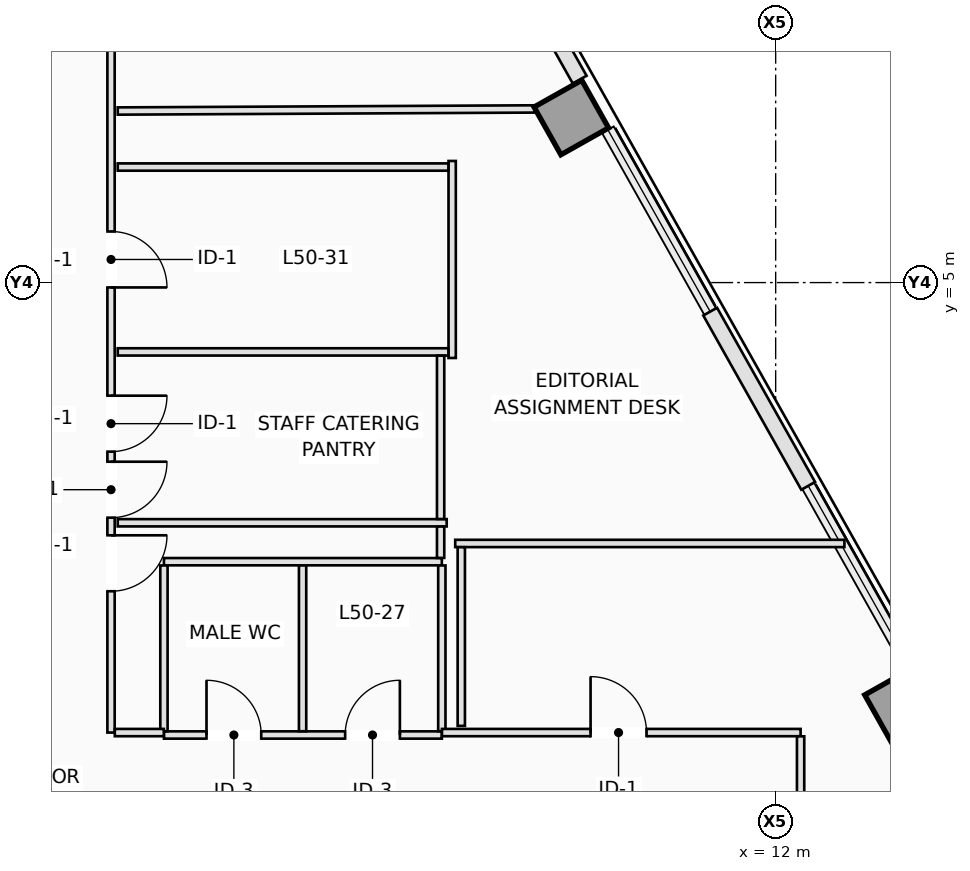
"""IFC4 building model, lengths in metres.
Left out: names, types, materials, properties, quantities, classifications, styles, units other than length and angle.
Written with IfcOpenShell. Run it as: python <this file> out.ifc"""

import sys

from ifc_helpers import new_model, si_unit, direction, frame, frame_2d, origin, origin_2d, place, context, subcontext, project, spatial, rectangle, extrude, element, fill, save


model = new_model("IFC4")
c1 = context("Model", 3, precision=1e-05, world=origin(), true_north=direction((0.0, 1.0)))
c2 = subcontext(c1, "Body", "Model", "MODEL_VIEW")
j1 = project(units=[si_unit("LENGTHUNIT", "METRE"), si_unit("PLANEANGLEUNIT", "RADIAN")], contexts=[c1])
p1 = place(None, origin())
s1 = spatial("IfcSite", under=j1, at=p1, CompositionType="ELEMENT")
p2 = place(p1, origin())
s2 = spatial("IfcBuilding", under=s1, at=p2, CompositionType="ELEMENT")
p3 = place(p2, frame((0.0, 0.0, 183.4)))
s3 = spatial("IfcBuildingStorey", under=s2, at=p3, CompositionType="ELEMENT", Elevation=183.4)
for number, where, z_axis, x_axis in (
    (1, (14.077, -1.952, 0.0), (0.0, 0.0, 1.0), (0.872, 0.49, 0.0)),
    (2, (8.64, 7.715, 0.0), (0.0, 0.0, 1.0), (0.872, 0.49, 0.0)),
):
    element("IfcColumn", number, at=place(p3, frame(where, z_axis=z_axis, x_axis=x_axis)), inside=s3, PredefinedType="COLUMN", context=c2, shape_type="SweptSolid", body=[
        extrude(rectangle(XDim=0.9, YDim=0.9, at=origin_2d()), origin(), (0.0, 0.0, 1.0), 3.5),
    ])
p4 = place(p3, frame((7.494, 10.618, 0.0), z_axis=(0.0, 0.0, 1.0), x_axis=(0.490301099378, -0.871553114818, 0.0)))
e3 = element("IfcWall", 3, at=p4, inside=s3, PredefinedType="STANDARD", context=c2, shape_type="SweptSolid", body=[
    extrude(rectangle(XDim=2.617, YDim=0.26, at=frame_2d((1.309, 0.0))), origin(), (0.0, 0.0, 1.0), 3.25),
])
p5 = place(p3, frame((10.923, 4.522, 0.0), z_axis=(0.0, 0.0, 1.0), x_axis=(0.490264765862, -0.871573553611, 0.0)))
e4 = element("IfcWall", 4, at=p5, inside=s3, PredefinedType="STANDARD", context=c2, shape_type="SweptSolid", body=[
    extrude(rectangle(XDim=3.287, YDim=0.26, at=frame_2d((1.644, 0.0))), origin(), (0.0, 0.0, 1.0), 3.25),
])
p6 = place(p3, frame((1.94, -2.44, 0.0), z_axis=(0.0, 0.0, 1.0), x_axis=(1.0, 0.0, 0.0)))
e5 = element("IfcWall", 5, at=p6, inside=s3, PredefinedType="PARTITIONING", context=c2, shape_type="SweptSolid", body=[
    extrude(rectangle(XDim=4.57, YDim=0.12, at=frame_2d((2.285, 0.0))), origin(), (0.0, 0.0, 1.0), 2.943),
])
p7 = place(p6, frame((0.7, 0.0, 0.0)))
e6 = element("IfcOpeningElement", 6, at=p7, cuts=e5, PredefinedType="OPENING", context=c2, shape_type="SweptSolid", body=[
    extrude(rectangle(XDim=0.9, YDim=2.12, at=frame_2d((0.45, 1.06))), frame((0.0, 0.07, 0.0), z_axis=(0.0, -1.0, 0.0), x_axis=(1.0, 0.0, 0.0)), (0.0, 0.0, 1.0), 0.14),
])
p8 = place(p6, frame((2.98, 0.0, 0.0)))
e7 = element("IfcOpeningElement", 7, at=p8, cuts=e5, PredefinedType="OPENING", context=c2, shape_type="SweptSolid", body=[
    extrude(rectangle(XDim=0.9, YDim=2.12, at=frame_2d((0.45, 1.06))), frame((0.0, 0.07, 0.0), z_axis=(0.0, -1.0, 0.0), x_axis=(1.0, 0.0, 0.0)), (0.0, 0.0, 1.0), 0.14),
])
p9 = place(p3, frame((1.94, 0.41, 0.0), z_axis=(0.0, 0.0, 1.0), x_axis=(1.0, 0.0, 0.0)))
e8 = element("IfcWall", 8, at=p9, inside=s3, PredefinedType="PARTITIONING", context=c2, shape_type="SweptSolid", body=[
    extrude(rectangle(XDim=4.57, YDim=0.12, at=frame_2d((2.285, 0.0))), origin(), (0.0, 0.0, 1.0), 3.25),
])
for number, where, z_axis, x_axis in (
    (9, (1.94, -2.378, 0.0), (0.0, 0.0, 1.0), (0.0, 1.0, 0.0)),
    (10, (4.22, -2.378, 0.0), (0.0, 0.0, 1.0), (0.0, 1.0, 0.0)),
    (11, (6.51, -2.378, 0.0), (0.0, 0.0, 1.0), (0.0, 1.0, 0.0)),
):
    element("IfcWall", number, at=place(p3, frame(where, z_axis=z_axis, x_axis=x_axis)), inside=s3, PredefinedType="PARTITIONING", context=c2, shape_type="SweptSolid", body=[
        extrude(rectangle(XDim=2.726, YDim=0.12, at=frame_2d((1.363, 0.0))), origin(), (0.0, 0.0, 1.0), 3.25),
    ])
p10 = place(p3, frame((1.07, 10.388, 0.0), z_axis=(0.0, 0.0, 1.0), x_axis=(0.0, -1.0, 0.0)))
e12 = element("IfcWall", 12, at=p10, inside=s3, PredefinedType="PARTITIONING", context=c2, shape_type="SweptSolid", body=[
    extrude(rectangle(XDim=12.788, YDim=0.12, at=frame_2d((6.394, 0.0))), origin(), (0.0, 0.0, 1.0), 3.25),
])
p11 = place(p10, frame((4.548, 0.0, 0.0)))
e13 = element("IfcOpeningElement", 13, at=p11, cuts=e12, PredefinedType="OPENING", context=c2, shape_type="SweptSolid", body=[
    extrude(rectangle(XDim=0.92, YDim=2.12, at=frame_2d((0.46, 1.06))), frame((0.0, 0.07, 0.0), z_axis=(0.0, -1.0, 0.0), x_axis=(1.0, 0.0, 0.0)), (0.0, 0.0, 1.0), 0.14),
])
p12 = place(p10, frame((8.334, 0.0, 0.0)))
e14 = element("IfcOpeningElement", 14, at=p12, cuts=e12, PredefinedType="OPENING", context=c2, shape_type="SweptSolid", body=[
    extrude(rectangle(XDim=0.92, YDim=2.12, at=frame_2d((0.46, 1.06))), frame((0.0, 0.07, 0.0), z_axis=(0.0, -1.0, 0.0), x_axis=(1.0, 0.0, 0.0)), (0.0, 0.0, 1.0), 0.14),
])
p13 = place(p10, frame((7.248, 0.0, 0.0)))
e15 = element("IfcOpeningElement", 15, at=p13, cuts=e12, PredefinedType="OPENING", context=c2, shape_type="SweptSolid", body=[
    extrude(rectangle(XDim=0.92, YDim=2.12, at=frame_2d((0.46, 1.06))), frame((0.0, 0.07, 0.0), z_axis=(0.0, -1.0, 0.0), x_axis=(1.0, 0.0, 0.0)), (0.0, 0.0, 1.0), 0.14),
])
p14 = place(p10, frame((9.544, 0.0, 0.0)))
e16 = element("IfcOpeningElement", 16, at=p14, cuts=e12, PredefinedType="OPENING", context=c2, shape_type="SweptSolid", body=[
    extrude(rectangle(XDim=0.92, YDim=2.12, at=frame_2d((0.46, 1.06))), frame((0.0, 0.07, 0.0), z_axis=(0.0, -1.0, 0.0), x_axis=(1.0, 0.0, 0.0)), (0.0, 0.0, 1.0), 0.14),
])
p15 = place(p3, frame((1.132, -2.4, 0.0), z_axis=(0.0, 0.0, 1.0), x_axis=(1.0, 0.0, 0.0)))
e17 = element("IfcWall", 17, at=p15, inside=s3, PredefinedType="PARTITIONING", context=c2, shape_type="SweptSolid", body=[
    extrude(rectangle(XDim=0.806, YDim=0.12, at=frame_2d((0.403, 0.0))), origin(), (0.0, 0.0, 1.0), 2.943),
])
p16 = place(p3, frame((6.512, -2.4, 0.0), z_axis=(0.0, 0.0, 1.0), x_axis=(1.0, 0.0, 0.0)))
e18 = element("IfcWall", 18, at=p16, inside=s3, PredefinedType="PARTITIONING", context=c2, shape_type="SweptSolid", body=[
    extrude(rectangle(XDim=5.898, YDim=0.12, at=frame_2d((2.949, 0.0))), origin(), (0.0, 0.0, 1.0), 3.25),
])
p17 = place(p16, frame((2.444, 0.0, 0.0)))
e19 = element("IfcOpeningElement", 19, at=p17, cuts=e18, PredefinedType="OPENING", context=c2, shape_type="SweptSolid", body=[
    extrude(rectangle(XDim=0.92, YDim=2.12, at=frame_2d((0.46, 1.06))), frame((0.0, 0.07, 0.0), z_axis=(0.0, -1.0, 0.0), x_axis=(1.0, 0.0, 0.0)), (0.0, 0.0, 1.0), 0.14),
])
p18 = place(p3, frame((12.41, -2.462, 0.0), z_axis=(0.0, 0.0, 1.0), x_axis=(0.0, -1.0, 0.0)))
e20 = element("IfcWall", 20, at=p18, inside=s3, PredefinedType="PARTITIONING", context=c2, shape_type="SweptSolid", body=[
    extrude(rectangle(XDim=2.611, YDim=0.12, at=frame_2d((1.306, 0.0))), origin(), (0.0, 0.0, 1.0), 3.25),
])
p19 = place(p3, frame((8.042, 7.856, 0.0), z_axis=(0.0, 0.0, 1.0), x_axis=(-0.999987417381, -0.0050164808, 0.0)))
e21 = element("IfcWall", 21, at=p19, inside=s3, PredefinedType="PARTITIONING", context=c2, shape_type="SweptSolid", body=[
    extrude(rectangle(XDim=6.862, YDim=0.12, at=frame_2d((3.431, 0.0))), origin(), (0.0, 0.0, 1.0), 3.25),
])
p20 = place(p3, frame((6.68, 7.0, 0.0), z_axis=(0.0, 0.0, 1.0), x_axis=(0.0, -1.0, 0.0)))
e22 = element("IfcWall", 22, at=p20, inside=s3, PredefinedType="PARTITIONING", context=c2, shape_type="SweptSolid", body=[
    extrude(rectangle(XDim=3.24, YDim=0.12, at=frame_2d((1.62, 0.0))), origin(), (0.0, 0.0, 1.0), 3.25),
])
p21 = place(p3, frame((1.18, 6.9, 0.0), z_axis=(0.0, 0.0, 1.0), x_axis=(1.0, 0.0, 0.0)))
e23 = element("IfcWall", 23, at=p21, inside=s3, PredefinedType="PARTITIONING", context=c2, shape_type="SweptSolid", body=[
    extrude(rectangle(XDim=5.438, YDim=0.12, at=frame_2d((2.719, 0.0))), origin(), (0.0, 0.0, 1.0), 3.25),
])
p22 = place(p3, frame((6.618, 3.86, 0.0), z_axis=(0.0, 0.0, 1.0), x_axis=(-1.0, 0.0, 0.0)))
e24 = element("IfcWall", 24, at=p22, inside=s3, PredefinedType="PARTITIONING", context=c2, shape_type="SweptSolid", body=[
    extrude(rectangle(XDim=5.438, YDim=0.12, at=frame_2d((2.719, 0.0))), origin(), (0.0, 0.0, 1.0), 2.943),
])
p23 = place(p3, frame((1.18, 1.05, 0.0), z_axis=(0.0, 0.0, 1.0), x_axis=(1.0, 0.0, 0.0)))
e25 = element("IfcWall", 25, at=p23, inside=s3, PredefinedType="PARTITIONING", context=c2, shape_type="SweptSolid", body=[
    extrude(rectangle(XDim=5.41, YDim=0.12, at=frame_2d((2.705, 0.0))), origin(), (0.0, 0.0, 1.0), 3.25),
])
p24 = place(p3, frame((6.49, 0.472, 0.0), z_axis=(0.0, 0.0, 1.0), x_axis=(0.0, 1.0, 0.0)))
e26 = element("IfcWall", 26, at=p24, inside=s3, PredefinedType="PARTITIONING", context=c2, shape_type="SweptSolid", body=[
    extrude(rectangle(XDim=0.516, YDim=0.12, at=frame_2d((0.258, 0.0))), origin(), (0.0, 0.0, 1.0), 3.25),
])
p25 = place(p3, frame((6.49, 1.112, 0.0), z_axis=(0.0, 0.0, 1.0), x_axis=(0.0, 1.0, 0.0)))
e27 = element("IfcWall", 27, at=p25, inside=s3, PredefinedType="PARTITIONING", context=c2, shape_type="SweptSolid", body=[
    extrude(rectangle(XDim=2.686, YDim=0.12, at=frame_2d((1.343, 0.0))), origin(), (0.0, 0.0, 1.0), 3.25),
])
p26 = place(p3, frame((13.131, 0.71, 0.0), z_axis=(0.0, 0.0, 1.0), x_axis=(-1.0, 0.0, 0.0)))
e28 = element("IfcWall", 28, at=p26, inside=s3, PredefinedType="PARTITIONING", context=c2, shape_type="SweptSolid", body=[
    extrude(rectangle(XDim=6.401, YDim=0.12, at=frame_2d((3.2, 0.0))), origin(), (0.0, 0.0, 1.0), 3.25),
])
p27 = place(p3, frame((6.83, 0.648, 0.0), z_axis=(0.0, 0.0, 1.0), x_axis=(0.0, -1.0, 0.0)))
e29 = element("IfcWall", 29, at=p27, inside=s3, PredefinedType="PARTITIONING", context=c2, shape_type="SweptSolid", body=[
    extrude(rectangle(XDim=2.938, YDim=0.12, at=frame_2d((1.469, 0.0))), origin(), (0.0, 0.0, 1.0), 3.25),
])
p28 = place(p7, origin())
e30 = element("IfcDoor", 30, at=p28, inside=s3, OperationType="SINGLE_SWING_LEFT", PredefinedType="DOOR", context=c2, shape_type="SweptSolid", body=[
    extrude(rectangle(XDim=0.9, YDim=2.12, at=frame_2d((0.45, 1.06))), frame((0.0, 0.025, 0.0), z_axis=(0.0, -1.0, 0.0), x_axis=(1.0, 0.0, 0.0)), (0.0, 0.0, 1.0), 0.05),
])
fill(e6, e30)
p29 = place(p8, origin())
e31 = element("IfcDoor", 31, at=p29, inside=s3, OperationType="SINGLE_SWING_RIGHT", PredefinedType="DOOR", context=c2, shape_type="SweptSolid", body=[
    extrude(rectangle(XDim=0.9, YDim=2.12, at=frame_2d((0.45, 1.06))), frame((0.0, 0.025, 0.0), z_axis=(0.0, -1.0, 0.0), x_axis=(1.0, 0.0, 0.0)), (0.0, 0.0, 1.0), 0.05),
])
fill(e7, e31)
p30 = place(p11, origin())
e32 = element("IfcDoor", 32, at=p30, inside=s3, OperationType="SINGLE_SWING_RIGHT", PredefinedType="DOOR", context=c2, shape_type="SweptSolid", body=[
    extrude(rectangle(XDim=0.92, YDim=2.12, at=frame_2d((0.46, 1.06))), frame((0.0, 0.025, 0.0), z_axis=(0.0, -1.0, 0.0), x_axis=(1.0, 0.0, 0.0)), (0.0, 0.0, 1.0), 0.05),
])
fill(e13, e32)
p31 = place(p12, origin())
e33 = element("IfcDoor", 33, at=p31, inside=s3, OperationType="SINGLE_SWING_LEFT", PredefinedType="DOOR", context=c2, shape_type="SweptSolid", body=[
    extrude(rectangle(XDim=0.92, YDim=2.12, at=frame_2d((0.46, 1.06))), frame((0.0, 0.025, 0.0), z_axis=(0.0, -1.0, 0.0), x_axis=(1.0, 0.0, 0.0)), (0.0, 0.0, 1.0), 0.05),
])
fill(e14, e33)
p32 = place(p13, origin())
e34 = element("IfcDoor", 34, at=p32, inside=s3, OperationType="SINGLE_SWING_LEFT", PredefinedType="DOOR", context=c2, shape_type="SweptSolid", body=[
    extrude(rectangle(XDim=0.92, YDim=2.12, at=frame_2d((0.46, 1.06))), frame((0.0, 0.025, 0.0), z_axis=(0.0, -1.0, 0.0), x_axis=(1.0, 0.0, 0.0)), (0.0, 0.0, 1.0), 0.05),
])
fill(e15, e34)
p33 = place(p17, origin())
e35 = element("IfcDoor", 35, at=p33, inside=s3, OperationType="SINGLE_SWING_LEFT", PredefinedType="DOOR", context=c2, shape_type="SweptSolid", body=[
    extrude(rectangle(XDim=0.92, YDim=2.12, at=frame_2d((0.46, 1.06))), frame((0.0, 0.025, 0.0), z_axis=(0.0, -1.0, 0.0), x_axis=(1.0, 0.0, 0.0)), (0.0, 0.0, 1.0), 0.05),
])
fill(e19, e35)
p34 = place(p14, origin())
e36 = element("IfcDoor", 36, at=p34, inside=s3, OperationType="SINGLE_SWING_LEFT", PredefinedType="DOOR", context=c2, shape_type="SweptSolid", body=[
    extrude(rectangle(XDim=0.92, YDim=2.12, at=frame_2d((0.46, 1.06))), frame((0.0, 0.025, 0.0), z_axis=(0.0, -1.0, 0.0), x_axis=(1.0, 0.0, 0.0)), (0.0, 0.0, 1.0), 0.05),
])
fill(e16, e36)
save(model, sys.argv[1])
